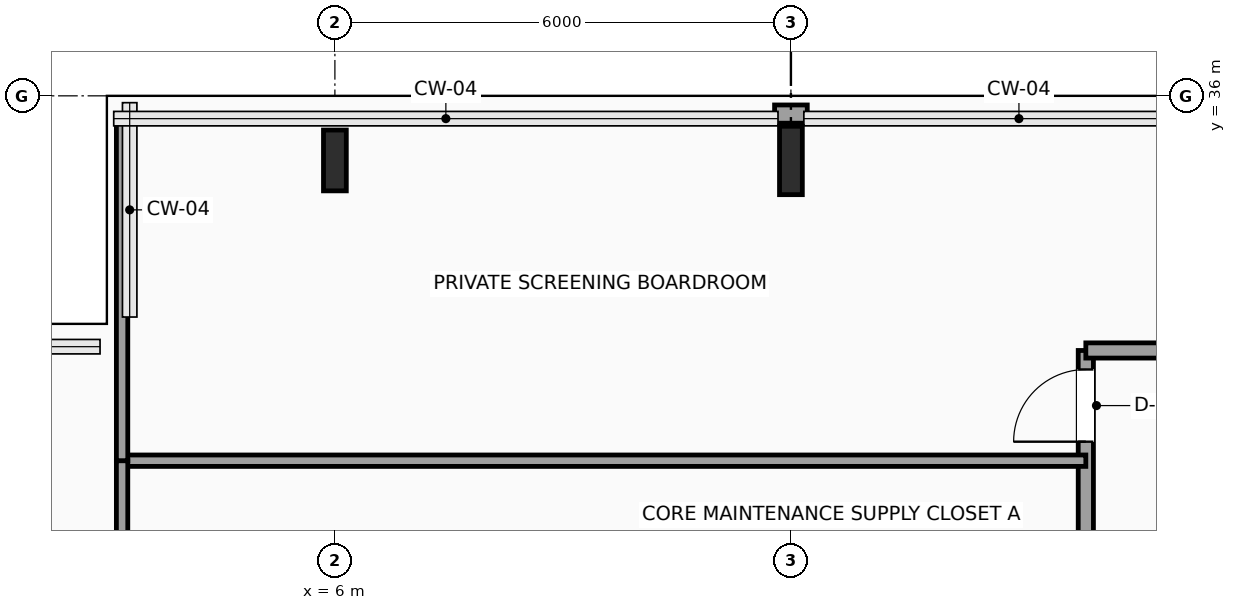
"""IFC4 building model, lengths in metres.
Left out: names, types, materials, properties, quantities, classifications, styles, units other than length and angle.
Written with IfcOpenShell. Run it as: python <this file> out.ifc"""

import sys

from ifc_helpers import new_model, si_unit, direction, frame, frame_2d, origin, origin_2d, place, context, subcontext, project, spatial, rectangle, i_section, extrude, element, fill, save


model = new_model("IFC4")
c1 = context("Model", 3, precision=1e-05, world=origin(), true_north=direction((0.0, 1.0)))
c2 = subcontext(c1, "Body", "Model", "MODEL_VIEW")
j1 = project(units=[si_unit("LENGTHUNIT", "METRE"), si_unit("PLANEANGLEUNIT", "RADIAN")], contexts=[c1])
p1 = place(None, origin())
s1 = spatial("IfcSite", under=j1, at=p1, CompositionType="ELEMENT")
p2 = place(p1, origin())
s2 = spatial("IfcBuilding", under=s1, at=p2, CompositionType="ELEMENT")
p3 = place(p2, frame((0.0, 0.0, 223.65)))
s3 = spatial("IfcBuildingStorey", under=s2, at=p3, CompositionType="ELEMENT", Elevation=223.65)
p4 = place(p3, frame((6.0, 35.15, 0.0), z_axis=(0.0, 0.0, 1.0), x_axis=(1.0, 0.0, 0.0)))
e1 = element("IfcColumn", 1, at=p4, inside=s3, PredefinedType="COLUMN", context=c2, shape_type="SweptSolid", body=[
    extrude(i_section(OverallWidth=0.3, OverallDepth=0.8, WebThickness=0.018, FlangeThickness=0.033, FilletRadius=0.03, at=origin_2d()), origin(), (0.0, 0.0, 1.0), 3.75),
])
p5 = place(p3, frame((12.0, 35.15, 0.0), z_axis=(0.0, 0.0, 1.0), x_axis=(1.0, 0.0, 0.0)))
e2 = element("IfcColumn", 2, at=p5, inside=s3, PredefinedType="COLUMN", context=c2, shape_type="SweptSolid", body=[
    extrude(i_section(OverallWidth=0.3, OverallDepth=0.9, WebThickness=0.019, FlangeThickness=0.035, FilletRadius=0.03, at=origin_2d()), origin(), (0.0, 0.0, 1.0), 3.75),
])
p6 = place(p3, frame((11.785, 35.76, 0.0), z_axis=(0.0, 0.0, 1.0), x_axis=(1.0, 0.0, 0.0)))
e3 = element("IfcWall", 3, at=p6, inside=s3, PredefinedType="SOLIDWALL", context=c2, shape_type="SweptSolid", body=[
    extrude(rectangle(XDim=0.43, YDim=0.24, at=frame_2d((0.215, 0.0))), origin(), (0.0, 0.0, 1.0), 3.54),
])
p7 = place(p3, frame((15.88, 30.25, 0.0), z_axis=(0.0, 0.0, 1.0), x_axis=(0.0, 1.0, 0.0)))
e4 = element("IfcWall", 4, at=p7, inside=s3, PredefinedType="SOLIDWALL", context=c2, shape_type="SweptSolid", body=[
    extrude(rectangle(XDim=2.4, YDim=0.2, at=frame_2d((1.2, 0.0))), origin(), (0.0, 0.0, 1.0), 3.54),
])
p8 = place(p7, frame((1.2, 0.0, 0.0)))
e5 = element("IfcOpeningElement", 5, at=p8, cuts=e4, PredefinedType="OPENING", context=c2, shape_type="SweptSolid", body=[
    extrude(rectangle(XDim=0.95, YDim=2.15, at=frame_2d((0.475, 1.075))), frame((0.0, 0.11, 0.0), z_axis=(0.0, -1.0, 0.0), x_axis=(1.0, 0.0, 0.0)), (0.0, 0.0, 1.0), 0.22),
])
p9 = place(p3, frame((15.88, 32.65, 0.0), z_axis=(0.0, 0.0, 1.0), x_axis=(1.0, 0.0, 0.0)))
e6 = element("IfcWall", 6, at=p9, inside=s3, PredefinedType="SOLIDWALL", context=c2, shape_type="SweptSolid", body=[
    extrude(rectangle(XDim=2.22, YDim=0.2, at=frame_2d((1.11, 0.0))), origin(), (0.0, 0.0, 1.0), 3.54),
])
p10 = place(p3, frame((3.2, 31.2, 0.0), z_axis=(0.0, 0.0, 1.0), x_axis=(1.0, 0.0, 0.0)))
e7 = element("IfcWall", 7, at=p10, inside=s3, PredefinedType="PARTITIONING", context=c2, shape_type="SweptSolid", body=[
    extrude(rectangle(XDim=12.68, YDim=0.15, at=frame_2d((6.34, 0.0))), origin(), (0.0, 0.0, 1.0), 3.54),
])
p11 = place(p3, frame((3.2, 27.65, 0.0), z_axis=(0.0, 0.0, 1.0), x_axis=(0.0, 1.0, 0.0)))
e8 = element("IfcWall", 8, at=p11, inside=s3, PredefinedType="PARTITIONING", context=c2, shape_type="SweptSolid", body=[
    extrude(rectangle(XDim=3.55, YDim=0.15, at=frame_2d((1.775, 0.0))), origin(), (0.0, 0.0, 1.0), 3.54),
])
p12 = place(p3, frame((3.2, 31.2, 0.0), z_axis=(0.0, 0.0, 1.0), x_axis=(0.0, 1.0, 0.0)))
e9 = element("IfcWall", 9, at=p12, inside=s3, PredefinedType="PARTITIONING", context=c2, shape_type="SweptSolid", body=[
    extrude(rectangle(XDim=4.5, YDim=0.15, at=frame_2d((2.25, 0.0))), origin(), (0.0, 0.0, 1.0), 3.54),
])
p13 = place(p8, origin())
e10 = element("IfcDoor", 10, at=p13, inside=s3, OperationType="SINGLE_SWING_LEFT", PredefinedType="DOOR", context=c2, shape_type="SweptSolid", body=[
    extrude(rectangle(XDim=0.95, YDim=2.15, at=frame_2d((0.475, 1.075))), frame((0.0, 0.025, 0.0), z_axis=(0.0, -1.0, 0.0), x_axis=(1.0, 0.0, 0.0)), (0.0, 0.0, 1.0), 0.05),
])
fill(e5, e10)
save(model, sys.argv[1])
